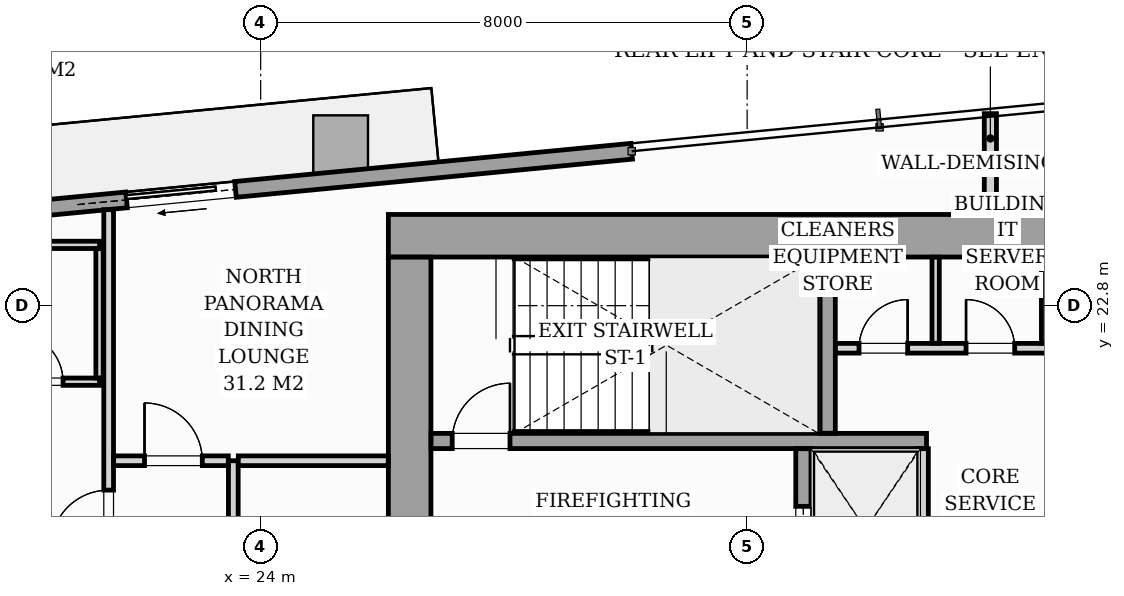
"""IFC4 building model, lengths in metres.
Left out: names, types, materials, properties, quantities, classifications, styles, units other than length and angle.
Written with IfcOpenShell. Run it as: python <this file> out.ifc"""

import sys

from ifc_helpers import new_model, si_unit, direction, frame, frame_2d, origin, origin_2d, place, context, subcontext, project, spatial, rectangle, i_section, extrude, source, transform, mapped, element, fill, save


model = new_model("IFC4")
c1 = context("Model", 3, precision=1e-05, world=origin(), true_north=direction((0.0, 1.0)))
c2 = subcontext(c1, "Body", "Model", "MODEL_VIEW")
j1 = project(units=[si_unit("LENGTHUNIT", "METRE"), si_unit("PLANEANGLEUNIT", "RADIAN")], contexts=[c1])
p1 = place(None, origin())
s1 = spatial("IfcSite", under=j1, at=p1, CompositionType="ELEMENT")
p2 = place(p1, origin())
s2 = spatial("IfcBuilding", under=s1, at=p2, CompositionType="ELEMENT")
p3 = place(p2, frame((0.0, 0.0, 109.8)))
s3 = spatial("IfcBuildingStorey", under=s2, at=p3, CompositionType="ELEMENT", Elevation=109.8)
m1 = source(origin(), c2, "Body", "SweptSolid", [
    extrude(i_section(OverallWidth=0.427, OverallDepth=0.483, WebThickness=0.051, FlangeThickness=0.082, FilletRadius=0.018, at=origin_2d()), origin(), (0.0, 0.0, 1.0), 3.196),
])
for number, where, z_axis, x_axis in (
    (1, (26.4, 24.0, 0.002), (0.0, 0.0, 1.0), (1.0, 0.0, 0.0)),
    (2, (33.12, 24.0, 0.002), (0.0, 0.0, 1.0), (1.0, 0.0, 0.0)),
):
    element("IfcColumn", number, at=place(p3, frame(where, z_axis=z_axis, x_axis=x_axis)), inside=s3, PredefinedType="PILASTER", context=c2, shape_type="MappedRepresentation", body=[
        mapped(m1, transform((0.0, 0.0, 0.0), scale=1.0)),
    ])
m2 = source(origin(), c2, "Body", "SweptSolid", [
    extrude(rectangle(XDim=0.9, YDim=1.1, at=origin_2d()), origin(), (0.0, 0.0, 1.0), 3.196),
])
p4 = place(p3, frame((25.315, 25.38, 0.002), z_axis=(0.0, 0.0, 1.0), x_axis=(0.995396198367, 0.09584575252, 0.0)))
e3 = element("IfcColumn", 3, at=p4, inside=s3, PredefinedType="COLUMN", context=c2, shape_type="MappedRepresentation", body=[
    mapped(m2, transform((0.0, 0.0, 0.0), scale=1.0)),
])
p5 = place(p3, frame((11.08, 23.508, 0.0), z_axis=(0.0, 0.0, 1.0), x_axis=(0.995396638587, 0.095841180552, 0.0)))
e4 = element("IfcWall", 4, at=p5, inside=s3, PredefinedType="STANDARD", context=c2, shape_type="SweptSolid", body=[
    extrude(rectangle(XDim=19.11, YDim=0.26, at=frame_2d((9.555, 0.0))), origin(), (0.0, 0.0, 1.0), 2.94),
])
p6 = place(p5, frame((10.764, 0.0, 0.0)))
e5 = element("IfcOpeningElement", 5, at=p6, cuts=e4, PredefinedType="OPENING", context=c2, shape_type="SweptSolid", body=[
    extrude(rectangle(XDim=1.8, YDim=2.06, at=frame_2d((0.9, 1.03))), frame((0.0, 0.14, 0.0), z_axis=(0.0, -1.0, 0.0), x_axis=(1.0, 0.0, 0.0)), (0.0, 0.0, 1.0), 0.28),
])
p7 = place(p5, frame((2.05, 0.0, 0.65)))
e6 = element("IfcOpeningElement", 6, at=p7, cuts=e4, PredefinedType="OPENING", context=c2, shape_type="SweptSolid", body=[
    extrude(rectangle(XDim=1.6, YDim=1.5, at=frame_2d((0.8, 0.75))), frame((0.0, 0.14, 0.0), z_axis=(0.0, -1.0, 0.0), x_axis=(1.0, 0.0, 0.0)), (0.0, 0.0, 1.0), 0.28),
])
p8 = place(p3, frame((26.1, 23.95, 0.0), z_axis=(0.0, 0.0, 1.0), x_axis=(1.0, 0.0, 0.0)))
e7 = element("IfcWall", 7, at=p8, inside=s3, PredefinedType="SHEAR", context=c2, shape_type="SweptSolid", body=[
    extrude(rectangle(XDim=19.8, YDim=0.7, at=frame_2d((9.9, 0.0))), origin(), (0.0, 0.0, 1.0), 3.2),
])
p9 = place(p3, frame((26.45, 17.802, 0.0), z_axis=(0.0, 0.0, 1.0), x_axis=(0.0, 1.0, 0.0)))
e8 = element("IfcWall", 8, at=p9, inside=s3, PredefinedType="SHEAR", context=c2, shape_type="SweptSolid", body=[
    extrude(rectangle(XDim=5.796, YDim=0.7, at=frame_2d((2.898, 0.0))), origin(), (0.0, 0.0, 1.0), 3.2),
])
p10 = place(p3, frame((26.802, 20.575, 0.0), z_axis=(0.0, 0.0, 1.0), x_axis=(1.0, 0.0, 0.0)))
e9 = element("IfcWall", 9, at=p10, inside=s3, PredefinedType="SOLIDWALL", context=c2, shape_type="SweptSolid", body=[
    extrude(rectangle(XDim=8.148, YDim=0.25, at=frame_2d((4.074, 0.0))), origin(), (0.0, 0.0, 1.0), 3.2),
])
p11 = place(p10, frame((0.348, 0.0, 0.0)))
e10 = element("IfcOpeningElement", 10, at=p11, cuts=e9, PredefinedType="OPENING", context=c2, shape_type="SweptSolid", body=[
    extrude(rectangle(XDim=0.95, YDim=2.06, at=frame_2d((0.475, 1.03))), frame((0.0, 0.135, 0.0), z_axis=(0.0, -1.0, 0.0), x_axis=(1.0, 0.0, 0.0)), (0.0, 0.0, 1.0), 0.27),
])
p12 = place(p3, frame((33.325, 20.702, 0.0), z_axis=(0.0, 0.0, 1.0), x_axis=(0.0, 1.0, 0.0)))
e11 = element("IfcWall", 11, at=p12, inside=s3, PredefinedType="SOLIDWALL", context=c2, shape_type="SweptSolid", body=[
    extrude(rectangle(XDim=2.896, YDim=0.25, at=frame_2d((1.448, 0.0))), origin(), (0.0, 0.0, 1.0), 3.2),
])
p13 = place(p3, frame((32.925, 17.802, 0.0), z_axis=(0.0, 0.0, 1.0), x_axis=(0.0, 1.0, 0.0)))
e12 = element("IfcWall", 12, at=p13, inside=s3, PredefinedType="SOLIDWALL", context=c2, shape_type="SweptSolid", body=[
    extrude(rectangle(XDim=2.646, YDim=0.25, at=frame_2d((1.323, 0.0))), origin(), (0.0, 0.0, 1.0), 3.2),
])
p14 = place(p13, frame((0.598, 0.0, 0.0)))
e13 = element("IfcOpeningElement", 13, at=p14, cuts=e12, PredefinedType="OPENING", context=c2, shape_type="SweptSolid", body=[
    extrude(rectangle(XDim=1.1, YDim=2.08, at=frame_2d((0.55, 1.04))), frame((0.0, 0.135, 0.0), z_axis=(0.0, -1.0, 0.0), x_axis=(1.0, 0.0, 0.0)), (0.0, 0.0, 1.0), 0.27),
])
p15 = place(p3, frame((34.9, 17.802, 0.0), z_axis=(0.0, 0.0, 1.0), x_axis=(0.0, 1.0, 0.0)))
e14 = element("IfcWall", 14, at=p15, inside=s3, PredefinedType="PARTITIONING", context=c2, shape_type="SweptSolid", body=[
    extrude(rectangle(XDim=2.646, YDim=0.16, at=frame_2d((1.323, 0.0))), origin(), (0.0, 0.0, 1.0), 2.94),
])
p16 = place(p3, frame((33.452, 22.1, 0.0), z_axis=(0.0, 0.0, 1.0), x_axis=(1.0, 0.0, 0.0)))
e15 = element("IfcWall", 15, at=p16, inside=s3, PredefinedType="PARTITIONING", context=c2, shape_type="SweptSolid", body=[
    extrude(rectangle(XDim=5.096, YDim=0.16, at=frame_2d((2.548, 0.0))), origin(), (0.0, 0.0, 1.0), 2.94),
])
p17 = place(p16, frame((0.388, 0.0, 0.0)))
e16 = element("IfcOpeningElement", 16, at=p17, cuts=e15, PredefinedType="OPENING", context=c2, shape_type="SweptSolid", body=[
    extrude(rectangle(XDim=0.8, YDim=2.05, at=frame_2d((0.4, 1.025))), frame((0.0, 0.09, 0.0), z_axis=(0.0, -1.0, 0.0), x_axis=(1.0, 0.0, 0.0)), (0.0, 0.0, 1.0), 0.18),
])
p18 = place(p16, frame((2.148, 0.0, 0.0)))
e17 = element("IfcOpeningElement", 17, at=p18, cuts=e15, PredefinedType="OPENING", context=c2, shape_type="SweptSolid", body=[
    extrude(rectangle(XDim=0.8, YDim=2.05, at=frame_2d((0.4, 1.025))), frame((0.0, 0.09, 0.0), z_axis=(0.0, -1.0, 0.0), x_axis=(1.0, 0.0, 0.0)), (0.0, 0.0, 1.0), 0.18),
])
p19 = place(p16, frame((3.908, 0.0, 0.0)))
e18 = element("IfcOpeningElement", 18, at=p19, cuts=e15, PredefinedType="OPENING", context=c2, shape_type="SweptSolid", body=[
    extrude(rectangle(XDim=0.8, YDim=2.05, at=frame_2d((0.4, 1.025))), frame((0.0, 0.09, 0.0), z_axis=(0.0, -1.0, 0.0), x_axis=(1.0, 0.0, 0.0)), (0.0, 0.0, 1.0), 0.18),
])
for number, where, z_axis, x_axis in (
    (19, (35.1, 22.182, 0.0), (0.0, 0.0, 1.0), (0.0, 1.0, 0.0)),
    (20, (36.9, 22.182, 0.0), (0.0, 0.0, 1.0), (0.0, 1.0, 0.0)),
):
    element("IfcWall", number, at=place(p3, frame(where, z_axis=z_axis, x_axis=x_axis)), inside=s3, PredefinedType="PARTITIONING", context=c2, shape_type="SweptSolid", body=[
        extrude(rectangle(XDim=1.416, YDim=0.12, at=frame_2d((0.708, 0.0))), origin(), (0.0, 0.0, 1.0), 2.94),
    ])
p20 = place(p3, frame((21.5, 12.732, 0.0), z_axis=(0.0, 0.0, 1.0), x_axis=(0.0, 1.0, 0.0)))
e21 = element("IfcWall", 21, at=p20, inside=s3, PredefinedType="PARTITIONING", context=c2, shape_type="SweptSolid", body=[
    extrude(rectangle(XDim=11.647, YDim=0.16, at=frame_2d((5.823, 0.0))), origin(), (0.0, 0.0, 1.0), 2.94),
])
p21 = place(p20, frame((0.493, 0.0, 0.0)))
e22 = element("IfcOpeningElement", 22, at=p21, cuts=e21, PredefinedType="OPENING", context=c2, shape_type="SweptSolid", body=[
    extrude(rectangle(XDim=0.95, YDim=2.06, at=frame_2d((0.475, 1.03))), frame((0.0, 0.09, 0.0), z_axis=(0.0, -1.0, 0.0), x_axis=(1.0, 0.0, 0.0)), (0.0, 0.0, 1.0), 0.18),
])
p22 = place(p20, frame((6.085, 0.0, 0.0)))
e23 = element("IfcOpeningElement", 23, at=p22, cuts=e21, PredefinedType="OPENING", context=c2, shape_type="SweptSolid", body=[
    extrude(rectangle(XDim=0.95, YDim=2.06, at=frame_2d((0.475, 1.03))), frame((0.0, 0.09, 0.0), z_axis=(0.0, -1.0, 0.0), x_axis=(1.0, 0.0, 0.0)), (0.0, 0.0, 1.0), 0.18),
])
p23 = place(p3, frame((36.0, 24.302, 0.0), z_axis=(0.0, 0.0, 1.0), x_axis=(0.0, 1.0, 0.0)))
e24 = element("IfcWall", 24, at=p23, inside=s3, PredefinedType="PARTITIONING", context=c2, shape_type="SweptSolid", body=[
    extrude(rectangle(XDim=1.656, YDim=0.2, at=frame_2d((0.828, 0.0))), origin(), (0.0, 0.0, 1.0), 2.94),
])
p24 = place(p3, frame((17.15, 21.55, 0.0), z_axis=(0.0, 0.0, 1.0), x_axis=(1.0, 0.0, 0.0)))
e25 = element("IfcWall", 25, at=p24, inside=s3, PredefinedType="PARTITIONING", context=c2, shape_type="SweptSolid", body=[
    extrude(rectangle(XDim=4.2, YDim=0.12, at=frame_2d((2.1, 0.0))), origin(), (0.0, 0.0, 1.0), 2.94),
])
p25 = place(p24, frame((0.675, 0.0, 0.0)))
e26 = element("IfcOpeningElement", 26, at=p25, cuts=e25, PredefinedType="OPENING", context=c2, shape_type="SweptSolid", body=[
    extrude(rectangle(XDim=0.85, YDim=2.05, at=frame_2d((0.425, 1.025))), frame((0.0, 0.07, 0.0), z_axis=(0.0, -1.0, 0.0), x_axis=(1.0, 0.0, 0.0)), (0.0, 0.0, 1.0), 0.14),
])
p26 = place(p24, frame((2.8, 0.0, 0.0)))
e27 = element("IfcOpeningElement", 27, at=p26, cuts=e25, PredefinedType="OPENING", context=c2, shape_type="SweptSolid", body=[
    extrude(rectangle(XDim=0.8, YDim=2.02, at=frame_2d((0.4, 1.01))), frame((0.0, 0.07, 0.0), z_axis=(0.0, -1.0, 0.0), x_axis=(1.0, 0.0, 0.0)), (0.0, 0.0, 1.0), 0.14),
])
p27 = place(p3, frame((17.15, 23.8, 0.0), z_axis=(0.0, 0.0, 1.0), x_axis=(1.0, 0.0, 0.0)))
e28 = element("IfcWall", 28, at=p27, inside=s3, PredefinedType="PARTITIONING", context=c2, shape_type="SweptSolid", body=[
    extrude(rectangle(XDim=4.2, YDim=0.12, at=frame_2d((2.1, 0.0))), origin(), (0.0, 0.0, 1.0), 2.31),
])
p28 = place(p3, frame((21.35, 21.612, 0.0), z_axis=(0.0, 0.0, 1.0), x_axis=(0.0, 1.0, 0.0)))
e29 = element("IfcWall", 29, at=p28, inside=s3, PredefinedType="PARTITIONING", context=c2, shape_type="SweptSolid", body=[
    extrude(rectangle(XDim=2.126, YDim=0.12, at=frame_2d((1.063, 0.0))), origin(), (0.0, 0.0, 1.0), 2.94),
])
p29 = place(p3, frame((23.55, 14.66, 0.0), z_axis=(0.0, 0.0, 1.0), x_axis=(0.0, 1.0, 0.0)))
e30 = element("IfcWall", 30, at=p29, inside=s3, PredefinedType="PARTITIONING", context=c2, shape_type="SweptSolid", body=[
    extrude(rectangle(XDim=5.59, YDim=0.16, at=frame_2d((2.795, 0.0))), origin(), (0.0, 0.0, 1.0), 2.94),
])
p30 = place(p29, frame((2.36, 0.0, 0.0)))
e31 = element("IfcOpeningElement", 31, at=p30, cuts=e30, PredefinedType="OPENING", context=c2, shape_type="SweptSolid", body=[
    extrude(rectangle(XDim=0.95, YDim=2.06, at=frame_2d((0.475, 1.03))), frame((0.0, 0.09, 0.0), z_axis=(0.0, -1.0, 0.0), x_axis=(1.0, 0.0, 0.0)), (0.0, 0.0, 1.0), 0.18),
])
p31 = place(p3, frame((21.582, 20.25, 0.0), z_axis=(0.0, 0.0, 1.0), x_axis=(1.0, 0.0, 0.0)))
e32 = element("IfcWall", 32, at=p31, inside=s3, PredefinedType="PARTITIONING", context=c2, shape_type="SweptSolid", body=[
    extrude(rectangle(XDim=1.886, YDim=0.16, at=frame_2d((0.943, 0.0))), origin(), (0.0, 0.0, 1.0), 2.94),
])
p32 = place(p31, frame((0.508, 0.0, 0.0)))
e33 = element("IfcOpeningElement", 33, at=p32, cuts=e32, PredefinedType="OPENING", context=c2, shape_type="SweptSolid", body=[
    extrude(rectangle(XDim=0.95, YDim=2.06, at=frame_2d((0.475, 1.03))), frame((0.0, 0.09, 0.0), z_axis=(0.0, -1.0, 0.0), x_axis=(1.0, 0.0, 0.0)), (0.0, 0.0, 1.0), 0.18),
])
p33 = place(p3, frame((23.632, 20.25, 0.0), z_axis=(0.0, 0.0, 1.0), x_axis=(1.0, 0.0, 0.0)))
e34 = element("IfcWall", 34, at=p33, inside=s3, PredefinedType="PARTITIONING", context=c2, shape_type="SweptSolid", body=[
    extrude(rectangle(XDim=2.466, YDim=0.16, at=frame_2d((1.233, 0.0))), origin(), (0.0, 0.0, 1.0), 2.94),
])
m3 = source(origin(), c2, "Body", "SweptSolid", [
    extrude(rectangle(XDim=1.8, YDim=2.06, at=frame_2d((0.9, 1.03))), frame((0.0, 0.025, 0.0), z_axis=(0.0, -1.0, 0.0), x_axis=(1.0, 0.0, 0.0)), (0.0, 0.0, 1.0), 0.05),
])
p34 = place(p6, origin())
e35 = element("IfcDoor", 35, at=p34, inside=s3, OperationType="SLIDING_TO_LEFT", PredefinedType="DOOR", context=c2, shape_type="MappedRepresentation", body=[
    mapped(m3, transform((0.0, 0.0, 0.0), scale=1.0)),
])
fill(e5, e35)
m4 = source(origin(), c2, "Body", "SweptSolid", [
    extrude(rectangle(XDim=0.95, YDim=2.06, at=frame_2d((0.475, 1.03))), frame((0.0, 0.025, 0.0), z_axis=(0.0, -1.0, 0.0), x_axis=(1.0, 0.0, 0.0)), (0.0, 0.0, 1.0), 0.05),
])
p35 = place(p11, origin())
e36 = element("IfcDoor", 36, at=p35, inside=s3, OperationType="SINGLE_SWING_RIGHT", PredefinedType="DOOR", context=c2, shape_type="MappedRepresentation", body=[
    mapped(m4, transform((0.0, 0.0, 0.0), scale=1.0)),
])
fill(e10, e36)
m5 = source(origin(), c2, "Body", "SweptSolid", [
    extrude(rectangle(XDim=1.1, YDim=2.08, at=frame_2d((0.55, 1.04))), frame((0.0, 0.025, 0.0), z_axis=(0.0, -1.0, 0.0), x_axis=(1.0, 0.0, 0.0)), (0.0, 0.0, 1.0), 0.05),
])
p36 = place(p14, origin())
e37 = element("IfcDoor", 37, at=p36, inside=s3, OperationType="SLIDING_TO_LEFT", PredefinedType="DOOR", context=c2, shape_type="MappedRepresentation", body=[
    mapped(m5, transform((0.0, 0.0, 0.0), scale=1.0)),
])
fill(e13, e37)
m6 = source(origin(), c2, "Body", "SweptSolid", [
    extrude(rectangle(XDim=0.8, YDim=2.05, at=frame_2d((0.4, 1.025))), frame((0.0, 0.025, 0.0), z_axis=(0.0, -1.0, 0.0), x_axis=(1.0, 0.0, 0.0)), (0.0, 0.0, 1.0), 0.05),
])
p37 = place(p17, origin())
e38 = element("IfcDoor", 38, at=p37, inside=s3, OperationType="SINGLE_SWING_RIGHT", PredefinedType="DOOR", context=c2, shape_type="MappedRepresentation", body=[
    mapped(m6, transform((0.0, 0.0, 0.0), scale=1.0)),
])
fill(e16, e38)
p38 = place(p18, origin())
e39 = element("IfcDoor", 39, at=p38, inside=s3, OperationType="SINGLE_SWING_LEFT", PredefinedType="DOOR", context=c2, shape_type="MappedRepresentation", body=[
    mapped(m6, transform((0.0, 0.0, 0.0), scale=1.0)),
])
fill(e17, e39)
m7 = source(origin(), c2, "Body", "SweptSolid", [
    extrude(rectangle(XDim=0.95, YDim=2.06, at=frame_2d((0.475, 1.03))), frame((0.0, 0.025, 0.0), z_axis=(0.0, -1.0, 0.0), x_axis=(1.0, 0.0, 0.0)), (0.0, 0.0, 1.0), 0.05),
])
p39 = place(p22, origin())
e40 = element("IfcDoor", 40, at=p39, inside=s3, OperationType="SINGLE_SWING_LEFT", PredefinedType="DOOR", context=c2, shape_type="MappedRepresentation", body=[
    mapped(m7, transform((0.0, 0.0, 0.0), scale=1.0)),
])
fill(e23, e40)
m8 = source(origin(), c2, "Body", "SweptSolid", [
    extrude(rectangle(XDim=0.8, YDim=2.02, at=frame_2d((0.4, 1.01))), frame((0.0, 0.025, 0.0), z_axis=(0.0, -1.0, 0.0), x_axis=(1.0, 0.0, 0.0)), (0.0, 0.0, 1.0), 0.05),
])
p40 = place(p26, origin())
e41 = element("IfcDoor", 41, at=p40, inside=s3, OperationType="SINGLE_SWING_LEFT", PredefinedType="DOOR", context=c2, shape_type="MappedRepresentation", body=[
    mapped(m8, transform((0.0, 0.0, 0.0), scale=1.0)),
])
fill(e27, e41)
p41 = place(p32, origin())
e42 = element("IfcDoor", 42, at=p41, inside=s3, OperationType="SINGLE_SWING_LEFT", PredefinedType="DOOR", context=c2, shape_type="MappedRepresentation", body=[
    mapped(m7, transform((0.0, 0.0, 0.0), scale=1.0)),
])
fill(e33, e42)
save(model, sys.argv[1])
